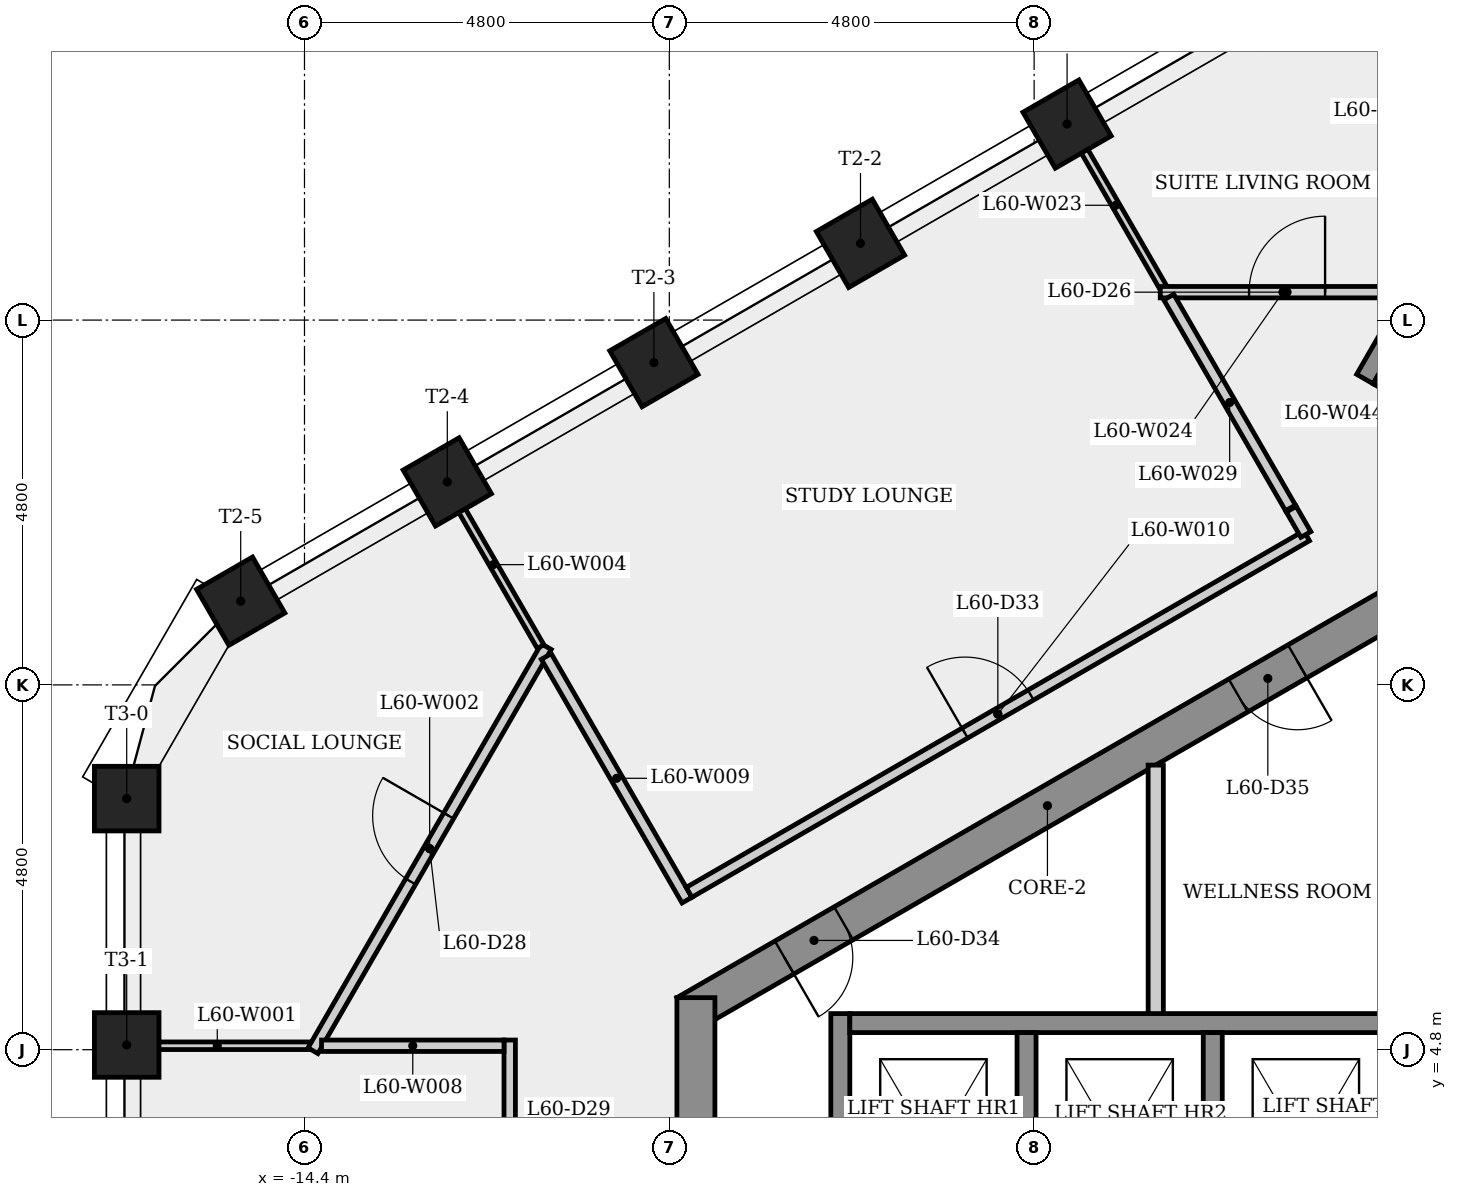
"""IFC4 building model, lengths in metres.
Left out: names, types, materials, properties, quantities, classifications, styles, units other than length and angle.
Written with IfcOpenShell. Run it as: python <this file> out.ifc"""

import sys

from ifc_helpers import new_model, si_unit, direction, frame, frame_2d, origin, origin_2d, place, context, subcontext, project, spatial, rectangle, extrude, element, fill, save


model = new_model("IFC4")
c1 = context("Model", 3, precision=1e-05, world=origin(), true_north=direction((0.0, 1.0)))
c2 = subcontext(c1, "Body", "Model", "MODEL_VIEW")
j1 = project(units=[si_unit("LENGTHUNIT", "METRE"), si_unit("PLANEANGLEUNIT", "RADIAN")], contexts=[c1])
p1 = place(None, origin())
s1 = spatial("IfcSite", under=j1, at=p1, CompositionType="ELEMENT")
p2 = place(p1, origin())
s2 = spatial("IfcBuilding", under=s1, at=p2, CompositionType="ELEMENT")
p3 = place(p2, frame((0.0, 0.0, 225.7)))
s3 = spatial("IfcBuildingStorey", under=s2, at=p3, CompositionType="ELEMENT", Elevation=225.7)
p4 = place(p3, frame((0.125, 10.753, 0.0), z_axis=(0.0, 0.0, 1.0), x_axis=(-0.866023993627, -0.500002442456, 0.0)))
e1 = element("IfcWall", 1, at=p4, inside=s3, PredefinedType="SHEAR", context=c2, shape_type="SweptSolid", body=[
    extrude(rectangle(XDim=10.97, YDim=0.5, at=frame_2d((5.485, 0.0))), origin(), (0.0, 0.0, 1.0), 3.4),
])
p5 = place(p4, frame((8.581, 0.0, 0.0)))
e2 = element("IfcOpeningElement", 2, at=p5, cuts=e1, PredefinedType="OPENING", context=c2, shape_type="SweptSolid", body=[
    extrude(rectangle(XDim=0.9, YDim=2.1, at=frame_2d((0.45, 1.05))), frame((0.0, 0.26, 0.0), z_axis=(0.0, -1.0, 0.0), x_axis=(1.0, 0.0, 0.0)), (0.0, 0.0, 1.0), 0.52),
])
p6 = place(p4, frame((1.687, 0.0, 0.0)))
e3 = element("IfcOpeningElement", 3, at=p6, cuts=e1, PredefinedType="OPENING", context=c2, shape_type="SweptSolid", body=[
    extrude(rectangle(XDim=0.9, YDim=2.1, at=frame_2d((0.45, 1.05))), frame((0.0, 0.26, 0.0), z_axis=(0.0, -1.0, 0.0), x_axis=(1.0, 0.0, 0.0)), (0.0, 0.0, 1.0), 0.52),
])
p7 = place(p3, frame((-9.25, 5.485, 0.0), z_axis=(0.0, 0.0, 1.0), x_axis=(0.0, -1.0, 0.0)))
e4 = element("IfcWall", 4, at=p7, inside=s3, PredefinedType="SHEAR", context=c2, shape_type="SweptSolid", body=[
    extrude(rectangle(XDim=10.97, YDim=0.5, at=frame_2d((5.485, 0.0))), origin(), (0.0, 0.0, 1.0), 3.4),
])
p8 = place(p7, frame((8.51, 0.0, 0.0)))
e5 = element("IfcOpeningElement", 5, at=p8, cuts=e4, PredefinedType="OPENING", context=c2, shape_type="SweptSolid", body=[
    extrude(rectangle(XDim=0.9, YDim=2.1, at=frame_2d((0.45, 1.05))), frame((0.0, 0.26, 0.0), z_axis=(0.0, -1.0, 0.0), x_axis=(1.0, 0.0, 0.0)), (0.0, 0.0, 1.0), 0.52),
])
p9 = place(p7, frame((4.685, 0.0, 0.0)))
e6 = element("IfcOpeningElement", 6, at=p9, cuts=e4, PredefinedType="OPENING", context=c2, shape_type="SweptSolid", body=[
    extrude(rectangle(XDim=1.6, YDim=2.1, at=frame_2d((0.8, 1.05))), frame((0.0, 0.26, 0.0), z_axis=(0.0, -1.0, 0.0), x_axis=(1.0, 0.0, 0.0)), (0.0, 0.0, 1.0), 0.52),
])
for number, where, z_axis, x_axis in (
    (7, (-4.366, 16.979, 0.0), (0.0, 0.0, 1.0), (-0.5, 0.866, 0.0)),
    (8, (-7.085, 15.41, 0.0), (0.0, 0.0, 1.0), (-0.5, 0.866, 0.0)),
    (9, (-9.803, 13.84, 0.0), (0.0, 0.0, 1.0), (-0.5, 0.866, 0.0)),
    (10, (-12.521, 12.271, 0.0), (0.0, 0.0, 1.0), (-0.5, 0.866, 0.0)),
    (11, (-15.239, 10.702, 0.0), (0.0, 0.0, 1.0), (-0.5, 0.866, 0.0)),
    (12, (-16.739, 8.104, 0.0), (0.0, 0.0, 1.0), (-1.0, 0.0, 0.0)),
    (13, (-16.739, 4.862, 0.0), (0.0, 0.0, 1.0), (-1.0, 0.0, 0.0)),
):
    element("IfcColumn", number, at=place(p3, frame(where, z_axis=z_axis, x_axis=x_axis)), inside=s3, PredefinedType="COLUMN", context=c2, shape_type="SweptSolid", body=[
        extrude(rectangle(XDim=0.85, YDim=0.85, at=origin_2d()), origin(), (0.0, 0.0, 1.0), 3.4),
    ])
p10 = place(p3, frame((-14.326, 4.852, 0.0), z_axis=(0.0, 0.0, 1.0), x_axis=(-1.0, 0.0, 0.0)))
e14 = element("IfcWall", 14, at=p10, inside=s3, PredefinedType="PARTITIONING", context=c2, shape_type="SweptSolid", body=[
    extrude(rectangle(XDim=2.443, YDim=0.1, at=frame_2d((1.222, 0.0))), origin(), (0.0, 0.0, 1.0), 3.05),
])
p11 = place(p3, frame((-14.288, 4.787, 0.0), z_axis=(0.0, 0.0, 1.0), x_axis=(0.499984068593, 0.866034601591, 0.0)))
e15 = element("IfcWall", 15, at=p11, inside=s3, PredefinedType="PARTITIONING", context=c2, shape_type="SweptSolid", body=[
    extrude(rectangle(XDim=6.139, YDim=0.15, at=frame_2d((3.07, 0.0))), origin(), (0.0, 0.0, 1.0), 3.05),
])
p12 = place(p11, frame((2.57, 0.0, 0.0)))
e16 = element("IfcOpeningElement", 16, at=p12, cuts=e15, PredefinedType="OPENING", context=c2, shape_type="SweptSolid", body=[
    extrude(rectangle(XDim=1.0, YDim=2.1, at=frame_2d((0.5, 1.05))), frame((0.0, 0.085, 0.0), z_axis=(0.0, -1.0, 0.0), x_axis=(1.0, 0.0, 0.0)), (0.0, 0.0, 1.0), 0.17),
])
p13 = place(p3, frame((-12.539, 12.261, 0.0), z_axis=(0.0, 0.0, 1.0), x_axis=(0.500008114086, -0.866020719064, 0.0)))
e17 = element("IfcWall", 17, at=p13, inside=s3, PredefinedType="PARTITIONING", context=c2, shape_type="SweptSolid", body=[
    extrude(rectangle(XDim=2.491, YDim=0.1, at=frame_2d((1.245, 0.0))), origin(), (0.0, 0.0, 1.0), 3.05),
])
p14 = place(p3, frame((-11.7, -4.852, 0.0), z_axis=(0.0, 0.0, 1.0), x_axis=(0.0, 1.0, 0.0)))
e18 = element("IfcWall", 18, at=p14, inside=s3, PredefinedType="PARTITIONING", context=c2, shape_type="SweptSolid", body=[
    extrude(rectangle(XDim=9.779, YDim=0.15, at=frame_2d((4.889, 0.0))), origin(), (0.0, 0.0, 1.0), 3.05),
])
p15 = place(p14, frame((7.586, 0.0, 0.0)))
e19 = element("IfcOpeningElement", 19, at=p15, cuts=e18, PredefinedType="OPENING", context=c2, shape_type="SweptSolid", body=[
    extrude(rectangle(XDim=1.0, YDim=2.1, at=frame_2d((0.5, 1.05))), frame((0.0, 0.085, 0.0), z_axis=(0.0, -1.0, 0.0), x_axis=(1.0, 0.0, 0.0)), (0.0, 0.0, 1.0), 0.17),
])
p16 = place(p14, frame((2.734, 0.0, 0.0)))
e20 = element("IfcOpeningElement", 20, at=p16, cuts=e18, PredefinedType="OPENING", context=c2, shape_type="SweptSolid", body=[
    extrude(rectangle(XDim=1.0, YDim=2.1, at=frame_2d((0.5, 1.05))), frame((0.0, 0.085, 0.0), z_axis=(0.0, -1.0, 0.0), x_axis=(1.0, 0.0, 0.0)), (0.0, 0.0, 1.0), 0.17),
])
p17 = place(p3, frame((-11.775, 4.852, 0.0), z_axis=(0.0, 0.0, 1.0), x_axis=(-1.0, 0.0, 0.0)))
e21 = element("IfcWall", 21, at=p17, inside=s3, PredefinedType="PARTITIONING", context=c2, shape_type="SweptSolid", body=[
    extrude(rectangle(XDim=2.401, YDim=0.15, at=frame_2d((1.2, 0.0))), origin(), (0.0, 0.0, 1.0), 3.05),
])
p18 = place(p3, frame((-11.219, 9.974, 0.0), z_axis=(0.0, 0.0, 1.0), x_axis=(0.500040243496, -0.866002167944, 0.0)))
e22 = element("IfcWall", 22, at=p18, inside=s3, PredefinedType="PARTITIONING", context=c2, shape_type="SweptSolid", body=[
    extrude(rectangle(XDim=3.702, YDim=0.15, at=frame_2d((1.851, 0.0))), origin(), (0.0, 0.0, 1.0), 3.05),
])
p19 = place(p3, frame((-9.34, 6.87, 0.0), z_axis=(0.0, 0.0, 1.0), x_axis=(0.866023086118, 0.500004014295, 0.0)))
e23 = element("IfcWall", 23, at=p19, inside=s3, PredefinedType="PARTITIONING", context=c2, shape_type="SweptSolid", body=[
    extrude(rectangle(XDim=9.382, YDim=0.15, at=frame_2d((4.691, 0.0))), origin(), (0.0, 0.0, 1.0), 3.05),
])
p20 = place(p19, frame((4.191, 0.0, 0.0)))
e24 = element("IfcOpeningElement", 24, at=p20, cuts=e23, PredefinedType="OPENING", context=c2, shape_type="SweptSolid", body=[
    extrude(rectangle(XDim=1.0, YDim=2.1, at=frame_2d((0.5, 1.05))), frame((0.0, 0.085, 0.0), z_axis=(0.0, -1.0, 0.0), x_axis=(1.0, 0.0, 0.0)), (0.0, 0.0, 1.0), 0.17),
])
p21 = place(p3, frame((-7.35, 1.925, 0.0), z_axis=(0.0, 0.0, 1.0), x_axis=(0.0, 1.0, 0.0)))
e25 = element("IfcWall", 25, at=p21, inside=s3, PredefinedType="SHEAR", context=c2, shape_type="SweptSolid", body=[
    extrude(rectangle(XDim=3.35, YDim=0.25, at=frame_2d((1.675, 0.0))), origin(), (0.0, 0.0, 1.0), 3.05),
])
p22 = place(p3, frame((-7.225, 5.15, 0.0), z_axis=(0.0, 0.0, 1.0), x_axis=(1.0, 0.0, 0.0)))
e26 = element("IfcWall", 26, at=p22, inside=s3, PredefinedType="SHEAR", context=c2, shape_type="SweptSolid", body=[
    extrude(rectangle(XDim=14.7, YDim=0.25, at=frame_2d((7.35, 0.0))), origin(), (0.0, 0.0, 1.0), 3.05),
])
p23 = place(p3, frame((-4.9, 5.025, 0.0), z_axis=(0.0, 0.0, 1.0), x_axis=(0.0, -1.0, 0.0)))
e27 = element("IfcWall", 27, at=p23, inside=s3, PredefinedType="SHEAR", context=c2, shape_type="SweptSolid", body=[
    extrude(rectangle(XDim=3.1, YDim=0.25, at=frame_2d((1.55, 0.0))), origin(), (0.0, 0.0, 1.0), 3.4),
])
p24 = place(p3, frame((-3.2, 8.545, 0.0), z_axis=(0.0, 0.0, 1.0), x_axis=(0.0, -1.0, 0.0)))
e28 = element("IfcWall", 28, at=p24, inside=s3, PredefinedType="PARTITIONING", context=c2, shape_type="SweptSolid", body=[
    extrude(rectangle(XDim=3.27, YDim=0.2, at=frame_2d((1.635, 0.0))), origin(), (0.0, 0.0, 1.0), 3.05),
])
p25 = place(p3, frame((-3.104, 14.832, 0.0), z_axis=(0.0, 0.0, 1.0), x_axis=(-0.499934593286, 0.866063163075, 0.0)))
e29 = element("IfcWall", 29, at=p25, inside=s3, PredefinedType="PARTITIONING", context=c2, shape_type="SweptSolid", body=[
    extrude(rectangle(XDim=2.49, YDim=0.1, at=frame_2d((1.245, 0.0))), origin(), (0.0, 0.0, 1.0), 3.05),
])
p26 = place(p3, frame((-3.141, 14.767, 0.0), z_axis=(0.0, 0.0, 1.0), x_axis=(1.0, 0.0, 0.0)))
e30 = element("IfcWall", 30, at=p26, inside=s3, PredefinedType="PARTITIONING", context=c2, shape_type="SweptSolid", body=[
    extrude(rectangle(XDim=3.228, YDim=0.15, at=frame_2d((1.614, 0.0))), origin(), (0.0, 0.0, 1.0), 3.05),
])
p27 = place(p26, frame((1.169, 0.0, 0.0)))
e31 = element("IfcOpeningElement", 31, at=p27, cuts=e30, PredefinedType="OPENING", context=c2, shape_type="SweptSolid", body=[
    extrude(rectangle(XDim=1.0, YDim=2.1, at=frame_2d((0.5, 1.05))), frame((0.0, 0.085, 0.0), z_axis=(0.0, -1.0, 0.0), x_axis=(1.0, 0.0, 0.0)), (0.0, 0.0, 1.0), 0.17),
])
p28 = place(p3, frame((-2.45, 5.025, 0.0), z_axis=(0.0, 0.0, 1.0), x_axis=(0.0, -1.0, 0.0)))
e32 = element("IfcWall", 32, at=p28, inside=s3, PredefinedType="SHEAR", context=c2, shape_type="SweptSolid", body=[
    extrude(rectangle(XDim=3.1, YDim=0.25, at=frame_2d((1.55, 0.0))), origin(), (0.0, 0.0, 1.0), 3.4),
])
p29 = place(p3, frame((-1.427, 11.928, 0.0), z_axis=(0.0, 0.0, 1.0), x_axis=(-0.499951191736, 0.866053581415, 0.0)))
e33 = element("IfcWall", 33, at=p29, inside=s3, PredefinedType="PARTITIONING", context=c2, shape_type="SweptSolid", body=[
    extrude(rectangle(XDim=3.203, YDim=0.15, at=frame_2d((1.602, 0.0))), origin(), (0.0, 0.0, 1.0), 3.05),
])
p30 = place(p3, frame((-1.417, 11.911, 0.0), z_axis=(0.0, 0.0, 1.0), x_axis=(0.500107979177, -0.865963053002, 0.0)))
e34 = element("IfcWall", 34, at=p30, inside=s3, PredefinedType="PARTITIONING", context=c2, shape_type="SweptSolid", body=[
    extrude(rectangle(XDim=0.384, YDim=0.15, at=frame_2d((0.192, 0.0))), origin(), (0.0, 0.0, 1.0), 3.05),
])
p31 = place(p3, frame((-0.448, 13.624, 0.0), z_axis=(0.0, 0.0, 1.0), x_axis=(0.500037662692, 0.866003658127, 0.0)))
e35 = element("IfcWall", 35, at=p31, inside=s3, PredefinedType="SHEAR", context=c2, shape_type="SweptSolid", body=[
    extrude(rectangle(XDim=2.95, YDim=0.25, at=frame_2d((1.475, 0.0))), origin(), (0.0, 0.0, 1.0), 3.05),
])
p32 = place(p3, frame((2.581, 12.02, 0.0), z_axis=(0.0, 0.0, 1.0), x_axis=(-0.866040211805, 0.499974350878, 0.0)))
e36 = element("IfcWall", 36, at=p32, inside=s3, PredefinedType="SHEAR", context=c2, shape_type="SweptSolid", body=[
    extrude(rectangle(XDim=3.3, YDim=0.25, at=frame_2d((1.65, 0.0))), origin(), (0.0, 0.0, 1.0), 3.05),
])
p33 = place(p27, origin())
e37 = element("IfcDoor", 37, at=p33, inside=s3, OperationType="SINGLE_SWING_RIGHT", PredefinedType="DOOR", context=c2, shape_type="SweptSolid", body=[
    extrude(rectangle(XDim=1.0, YDim=2.1, at=frame_2d((0.5, 1.05))), frame((0.0, 0.025, 0.0), z_axis=(0.0, -1.0, 0.0), x_axis=(1.0, 0.0, 0.0)), (0.0, 0.0, 1.0), 0.05),
])
fill(e31, e37)
p34 = place(p12, origin())
e38 = element("IfcDoor", 38, at=p34, inside=s3, OperationType="SINGLE_SWING_RIGHT", PredefinedType="DOOR", context=c2, shape_type="SweptSolid", body=[
    extrude(rectangle(XDim=1.0, YDim=2.1, at=frame_2d((0.5, 1.05))), frame((0.0, 0.025, 0.0), z_axis=(0.0, -1.0, 0.0), x_axis=(1.0, 0.0, 0.0)), (0.0, 0.0, 1.0), 0.05),
])
fill(e16, e38)
p35 = place(p20, origin())
e39 = element("IfcDoor", 39, at=p35, inside=s3, OperationType="SINGLE_SWING_LEFT", PredefinedType="DOOR", context=c2, shape_type="SweptSolid", body=[
    extrude(rectangle(XDim=1.0, YDim=2.1, at=frame_2d((0.5, 1.05))), frame((0.0, 0.025, 0.0), z_axis=(0.0, -1.0, 0.0), x_axis=(1.0, 0.0, 0.0)), (0.0, 0.0, 1.0), 0.05),
])
fill(e24, e39)
p36 = place(p5, origin())
e40 = element("IfcDoor", 40, at=p36, inside=s3, OperationType="SINGLE_SWING_RIGHT", PredefinedType="DOOR", context=c2, shape_type="SweptSolid", body=[
    extrude(rectangle(XDim=0.9, YDim=2.1, at=frame_2d((0.45, 1.05))), frame((0.0, 0.025, 0.0), z_axis=(0.0, -1.0, 0.0), x_axis=(1.0, 0.0, 0.0)), (0.0, 0.0, 1.0), 0.05),
])
fill(e2, e40)
p37 = place(p6, origin())
e41 = element("IfcDoor", 41, at=p37, inside=s3, OperationType="SINGLE_SWING_LEFT", PredefinedType="DOOR", context=c2, shape_type="SweptSolid", body=[
    extrude(rectangle(XDim=0.9, YDim=2.1, at=frame_2d((0.45, 1.05))), frame((0.0, 0.025, 0.0), z_axis=(0.0, -1.0, 0.0), x_axis=(1.0, 0.0, 0.0)), (0.0, 0.0, 1.0), 0.05),
])
fill(e3, e41)
save(model, sys.argv[1])
